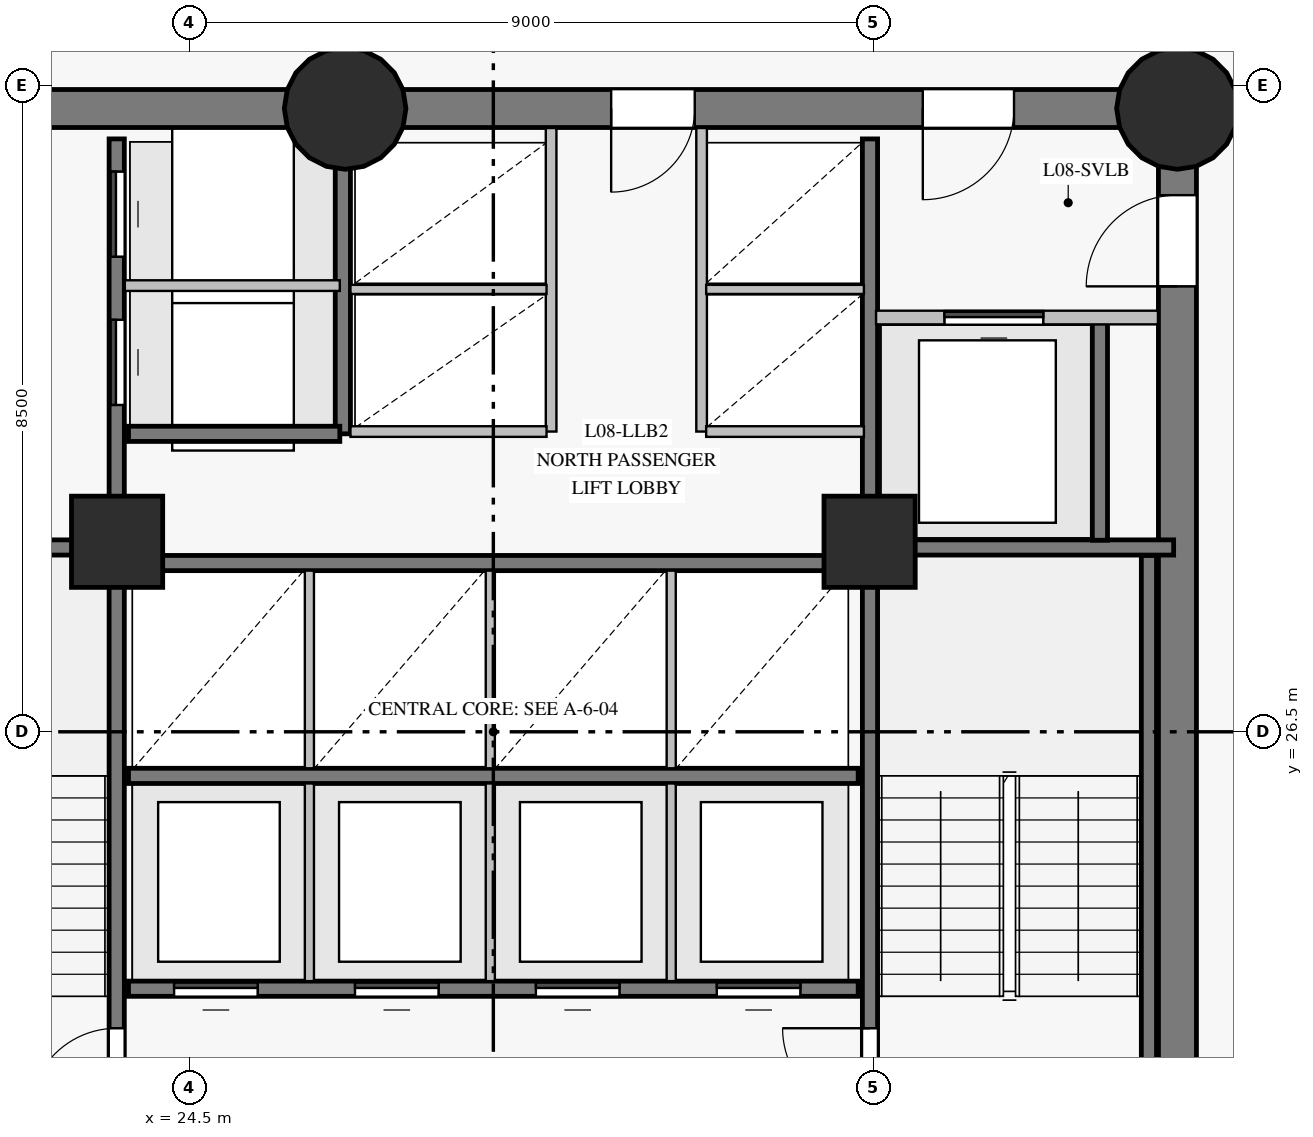
"""IFC4 building model, lengths in metres.
Left out: names, types, materials, properties, quantities, classifications, styles, units other than length and angle.
Written with IfcOpenShell. Run it as: python <this file> out.ifc"""

import sys

from ifc_helpers import new_model, si_unit, direction, frame, frame_2d, origin, origin_with_axes, origin_2d, place, context, subcontext, project, spatial, rectangle, circle, extrude, source, transform, mapped, element, fill, save


model = new_model("IFC4")
c1 = context("Model", 3, precision=1e-05, world=origin(), true_north=direction((0.0, 1.0)))
c2 = subcontext(c1, "Body", "Model", "MODEL_VIEW")
j1 = project(units=[si_unit("LENGTHUNIT", "METRE"), si_unit("PLANEANGLEUNIT", "RADIAN")], contexts=[c1])
p1 = place(None, origin())
s1 = spatial("IfcSite", under=j1, at=p1, CompositionType="ELEMENT")
p2 = place(p1, origin())
s2 = spatial("IfcBuilding", under=s1, at=p2, CompositionType="ELEMENT")
p3 = place(p2, frame((0.0, 0.0, 33.7)))
s3 = spatial("IfcBuildingStorey", under=s2, at=p3, CompositionType="ELEMENT", Elevation=33.7)
p4 = place(p3, frame((37.5, 18.3, 0.0), z_axis=(0.0, 0.0, 1.0), x_axis=(0.0, 1.0, 0.0)))
e1 = element("IfcWall", 1, at=p4, inside=s3, PredefinedType="SHEAR", context=c2, shape_type="SweptSolid", body=[
    extrude(rectangle(XDim=16.4, YDim=0.5, at=frame_2d((8.2, 0.0))), origin(), (0.0, 0.0, 1.0), 3.35),
])
p5 = place(p4, frame((14.06, 0.0, 0.0)))
e2 = element("IfcOpeningElement", 2, at=p5, cuts=e1, PredefinedType="OPENING", context=c2, shape_type="SweptSolid", body=[
    extrude(rectangle(XDim=1.2, YDim=2.15, at=frame_2d((0.6, 1.075))), frame((0.0, 0.26, 0.0), z_axis=(0.0, -1.0, 0.0), x_axis=(1.0, 0.0, 0.0)), (0.0, 0.0, 1.0), 0.52),
])
p6 = place(p3, frame((37.5, 34.7, 0.0), z_axis=(0.0, 0.0, 1.0), x_axis=(-1.0, 0.0, 0.0)))
e3 = element("IfcWall", 3, at=p6, inside=s3, PredefinedType="SHEAR", context=c2, shape_type="SweptSolid", body=[
    extrude(rectangle(XDim=10.95, YDim=0.5, at=frame_2d((5.475, 0.0))), origin(), (0.0, 0.0, 1.0), 3.35),
])
p7 = place(p6, frame((2.15, 0.0, 0.0)))
e4 = element("IfcOpeningElement", 4, at=p7, cuts=e3, PredefinedType="OPENING", context=c2, shape_type="SweptSolid", body=[
    extrude(rectangle(XDim=1.2, YDim=2.15, at=frame_2d((0.6, 1.075))), frame((0.0, 0.26, 0.0), z_axis=(0.0, -1.0, 0.0), x_axis=(1.0, 0.0, 0.0)), (0.0, 0.0, 1.0), 0.52),
])
p8 = place(p6, frame((6.35, 0.0, 0.0)))
e5 = element("IfcOpeningElement", 5, at=p8, cuts=e3, PredefinedType="OPENING", context=c2, shape_type="SweptSolid", body=[
    extrude(rectangle(XDim=1.1, YDim=2.15, at=frame_2d((0.55, 1.075))), frame((0.0, 0.26, 0.0), z_axis=(0.0, -1.0, 0.0), x_axis=(1.0, 0.0, 0.0)), (0.0, 0.0, 1.0), 0.52),
])
p9 = place(p3, frame((26.55, 34.7, 0.0), z_axis=(0.0, 0.0, 1.0), x_axis=(-1.0, 0.0, 0.0)))
e6 = element("IfcWall", 6, at=p9, inside=s3, PredefinedType="SHEAR", context=c2, shape_type="SweptSolid", body=[
    extrude(rectangle(XDim=7.05, YDim=0.5, at=frame_2d((3.525, 0.0))), origin(), (0.0, 0.0, 1.0), 3.35),
])
p10 = place(p9, frame((4.25, 0.0, 0.0)))
e7 = element("IfcOpeningElement", 7, at=p10, cuts=e6, PredefinedType="OPENING", context=c2, shape_type="SweptSolid", body=[
    extrude(rectangle(XDim=1.1, YDim=2.15, at=frame_2d((0.55, 1.075))), frame((0.0, 0.26, 0.0), z_axis=(0.0, -1.0, 0.0), x_axis=(1.0, 0.0, 0.0)), (0.0, 0.0, 1.0), 0.52),
])
m1 = source(origin_with_axes(), c2, "Body", "SweptSolid", [
    extrude(circle(Radius=0.8, at=origin_2d()), origin(), (0.0, 0.0, 1.0), 3.6),
])
for number, where, z_axis, x_axis in (
    (8, (26.55, 34.7, 0.0), (0.0, 0.0, 1.0), (1.0, 0.0, 0.0)),
    (9, (37.5, 34.7, 0.0), (0.0, 0.0, 1.0), (1.0, 0.0, 0.0)),
):
    element("IfcColumn", number, at=place(p3, frame(where, z_axis=z_axis, x_axis=x_axis)), inside=s3, PredefinedType="COLUMN", context=c2, shape_type="MappedRepresentation", body=[
        mapped(m1, transform((0.0, 0.0, 0.0), scale=1.0)),
    ])
m2 = source(origin_with_axes(), c2, "Body", "SweptSolid", [
    extrude(rectangle(XDim=1.2, YDim=1.2, at=origin_2d()), origin(), (0.0, 0.0, 1.0), 3.6),
])
for number, where, z_axis, x_axis in (
    (10, (23.55, 29.0, 0.0), (0.0, 0.0, 1.0), (1.0, 0.0, 0.0)),
    (11, (33.45, 29.0, 0.0), (0.0, 0.0, 1.0), (1.0, 0.0, 0.0)),
):
    element("IfcColumn", number, at=place(p3, frame(where, z_axis=z_axis, x_axis=x_axis)), inside=s3, PredefinedType="COLUMN", context=c2, shape_type="MappedRepresentation", body=[
        mapped(m2, transform((0.0, 0.0, 0.0), scale=1.0)),
    ])
p11 = place(p3, frame((23.545, 18.7, 0.0), z_axis=(0.0, 0.0, 1.0), x_axis=(0.0, 1.0, 0.0)))
e12 = element("IfcWall", 12, at=p11, inside=s3, PredefinedType="SHEAR", context=c2, shape_type="SweptSolid", body=[
    extrude(rectangle(XDim=15.6, YDim=0.2, at=frame_2d((7.8, 0.0))), origin(), (0.0, 0.0, 1.0), 3.35),
])
p12 = place(p11, frame((2.75, 0.0, 0.0)))
e13 = element("IfcOpeningElement", 13, at=p12, cuts=e12, PredefinedType="OPENING", context=c2, shape_type="SweptSolid", body=[
    extrude(rectangle(XDim=1.15, YDim=2.15, at=frame_2d((0.575, 1.075))), frame((0.0, 0.11, 0.0), z_axis=(0.0, -1.0, 0.0), x_axis=(1.0, 0.0, 0.0)), (0.0, 0.0, 1.0), 0.22),
])
p13 = place(p11, frame((0.14, 0.0, 0.0)))
e14 = element("IfcOpeningElement", 14, at=p13, cuts=e12, PredefinedType="OPENING", context=c2, shape_type="SweptSolid", body=[
    extrude(rectangle(XDim=0.88, YDim=2.1, at=frame_2d((0.44, 1.05))), frame((0.0, 0.11, 0.0), z_axis=(0.0, -1.0, 0.0), x_axis=(1.0, 0.0, 0.0)), (0.0, 0.0, 1.0), 0.22),
])
p14 = place(p11, frame((1.36, 0.0, 0.0)))
e15 = element("IfcOpeningElement", 15, at=p14, cuts=e12, PredefinedType="OPENING", context=c2, shape_type="SweptSolid", body=[
    extrude(rectangle(XDim=0.88, YDim=2.1, at=frame_2d((0.44, 1.05))), frame((0.0, 0.11, 0.0), z_axis=(0.0, -1.0, 0.0), x_axis=(1.0, 0.0, 0.0)), (0.0, 0.0, 1.0), 0.22),
])
p15 = place(p11, frame((12.1, 0.0, 0.0)))
e16 = element("IfcOpeningElement", 16, at=p15, cuts=e12, PredefinedType="OPENING", context=c2, shape_type="SweptSolid", body=[
    extrude(rectangle(XDim=1.12, YDim=2.15, at=frame_2d((0.56, 1.075))), frame((0.0, 0.11, 0.0), z_axis=(0.0, -1.0, 0.0), x_axis=(1.0, 0.0, 0.0)), (0.0, 0.0, 1.0), 0.22),
])
p16 = place(p11, frame((14.05, 0.0, 0.0)))
e17 = element("IfcOpeningElement", 17, at=p16, cuts=e12, PredefinedType="OPENING", context=c2, shape_type="SweptSolid", body=[
    extrude(rectangle(XDim=1.12, YDim=2.15, at=frame_2d((0.56, 1.075))), frame((0.0, 0.11, 0.0), z_axis=(0.0, -1.0, 0.0), x_axis=(1.0, 0.0, 0.0)), (0.0, 0.0, 1.0), 0.22),
])
p17 = place(p3, frame((33.455, 18.7, 0.0), z_axis=(0.0, 0.0, 1.0), x_axis=(0.0, 1.0, 0.0)))
e18 = element("IfcWall", 18, at=p17, inside=s3, PredefinedType="SHEAR", context=c2, shape_type="SweptSolid", body=[
    extrude(rectangle(XDim=15.6, YDim=0.2, at=frame_2d((7.8, 0.0))), origin(), (0.0, 0.0, 1.0), 3.35),
])
p18 = place(p17, frame((2.75, 0.0, 0.0)))
e19 = element("IfcOpeningElement", 19, at=p18, cuts=e18, PredefinedType="OPENING", context=c2, shape_type="SweptSolid", body=[
    extrude(rectangle(XDim=1.15, YDim=2.15, at=frame_2d((0.575, 1.075))), frame((0.0, 0.11, 0.0), z_axis=(0.0, -1.0, 0.0), x_axis=(1.0, 0.0, 0.0)), (0.0, 0.0, 1.0), 0.22),
])
p19 = place(p17, frame((0.55, 0.0, 0.0)))
e20 = element("IfcOpeningElement", 20, at=p19, cuts=e18, PredefinedType="OPENING", context=c2, shape_type="SweptSolid", body=[
    extrude(rectangle(XDim=0.94, YDim=2.1, at=frame_2d((0.47, 1.05))), frame((0.0, 0.11, 0.0), z_axis=(0.0, -1.0, 0.0), x_axis=(1.0, 0.0, 0.0)), (0.0, 0.0, 1.0), 0.22),
])
p20 = place(p3, frame((23.7, 23.12, 0.0), z_axis=(0.0, 0.0, 1.0), x_axis=(1.0, 0.0, 0.0)))
e21 = element("IfcWall", 21, at=p20, inside=s3, PredefinedType="SHEAR", context=c2, shape_type="SweptSolid", body=[
    extrude(rectangle(XDim=9.6, YDim=0.2, at=frame_2d((4.8, 0.0))), origin(), (0.0, 0.0, 1.0), 3.35),
])
p21 = place(p20, frame((0.6, 0.0, 0.0)))
e22 = element("IfcOpeningElement", 22, at=p21, cuts=e21, PredefinedType="OPENING", context=c2, shape_type="SweptSolid", body=[
    extrude(rectangle(XDim=1.1, YDim=2.15, at=frame_2d((0.55, 1.075))), frame((0.0, 0.11, 0.0), z_axis=(0.0, -1.0, 0.0), x_axis=(1.0, 0.0, 0.0)), (0.0, 0.0, 1.0), 0.22),
])
p22 = place(p20, frame((2.98, 0.0, 0.0)))
e23 = element("IfcOpeningElement", 23, at=p22, cuts=e21, PredefinedType="OPENING", context=c2, shape_type="SweptSolid", body=[
    extrude(rectangle(XDim=1.1, YDim=2.15, at=frame_2d((0.55, 1.075))), frame((0.0, 0.11, 0.0), z_axis=(0.0, -1.0, 0.0), x_axis=(1.0, 0.0, 0.0)), (0.0, 0.0, 1.0), 0.22),
])
p23 = place(p20, frame((5.36, 0.0, 0.0)))
e24 = element("IfcOpeningElement", 24, at=p23, cuts=e21, PredefinedType="OPENING", context=c2, shape_type="SweptSolid", body=[
    extrude(rectangle(XDim=1.1, YDim=2.15, at=frame_2d((0.55, 1.075))), frame((0.0, 0.11, 0.0), z_axis=(0.0, -1.0, 0.0), x_axis=(1.0, 0.0, 0.0)), (0.0, 0.0, 1.0), 0.22),
])
p24 = place(p20, frame((7.74, 0.0, 0.0)))
e25 = element("IfcOpeningElement", 25, at=p24, cuts=e21, PredefinedType="OPENING", context=c2, shape_type="SweptSolid", body=[
    extrude(rectangle(XDim=1.1, YDim=2.15, at=frame_2d((0.55, 1.075))), frame((0.0, 0.11, 0.0), z_axis=(0.0, -1.0, 0.0), x_axis=(1.0, 0.0, 0.0)), (0.0, 0.0, 1.0), 0.22),
])
for number, where, z_axis, x_axis in (
    (26, (23.7, 25.92, 0.0), (0.0, 0.0, 1.0), (1.0, 0.0, 0.0)),
    (27, (23.7, 28.72, 0.0), (0.0, 0.0, 1.0), (1.0, 0.0, 0.0)),
):
    element("IfcWall", number, at=place(p3, frame(where, z_axis=z_axis, x_axis=x_axis)), inside=s3, PredefinedType="SHEAR", context=c2, shape_type="SweptSolid", body=[
        extrude(rectangle(XDim=9.6, YDim=0.2, at=frame_2d((4.8, 0.0))), origin(), (0.0, 0.0, 1.0), 3.35),
    ])
p25 = place(p3, frame((37.125, 21.32, 0.0), z_axis=(0.0, 0.0, 1.0), x_axis=(0.0, 1.0, 0.0)))
e28 = element("IfcWall", 28, at=p25, inside=s3, PredefinedType="SHEAR", context=c2, shape_type="SweptSolid", body=[
    extrude(rectangle(XDim=7.5, YDim=0.2, at=frame_2d((3.75, 0.0))), origin(), (0.0, 0.0, 1.0), 3.35),
])
for number, where, z_axis, x_axis in (
    (29, (33.455, 28.925, 0.0), (0.0, 0.0, 1.0), (1.0, 0.0, 0.0)),
    (30, (19.55, 28.925, 0.0), (0.0, 0.0, 1.0), (1.0, 0.0, 0.0)),
):
    element("IfcWall", number, at=place(p3, frame(where, z_axis=z_axis, x_axis=x_axis)), inside=s3, PredefinedType="SHEAR", context=c2, shape_type="SweptSolid", body=[
        extrude(rectangle(XDim=3.995, YDim=0.2, at=frame_2d((1.998, 0.0))), origin(), (0.0, 0.0, 1.0), 3.35),
    ])
p26 = place(p3, frame((26.52, 30.42, 0.0), z_axis=(0.0, 0.0, 1.0), x_axis=(0.0, 1.0, 0.0)))
e31 = element("IfcWall", 31, at=p26, inside=s3, PredefinedType="SHEAR", context=c2, shape_type="SweptSolid", body=[
    extrude(rectangle(XDim=3.86, YDim=0.2, at=frame_2d((1.93, 0.0))), origin(), (0.0, 0.0, 1.0), 3.35),
])
p27 = place(p3, frame((36.48, 29.02, 0.0), z_axis=(0.0, 0.0, 1.0), x_axis=(0.0, 1.0, 0.0)))
e32 = element("IfcWall", 32, at=p27, inside=s3, PredefinedType="SHEAR", context=c2, shape_type="SweptSolid", body=[
    extrude(rectangle(XDim=2.86, YDim=0.2, at=frame_2d((1.43, 0.0))), origin(), (0.0, 0.0, 1.0), 3.35),
])
p28 = place(p3, frame((23.7, 30.42, 0.0), z_axis=(0.0, 0.0, 1.0), x_axis=(1.0, 0.0, 0.0)))
e33 = element("IfcWall", 33, at=p28, inside=s3, PredefinedType="SHEAR", context=c2, shape_type="SweptSolid", body=[
    extrude(rectangle(XDim=2.78, YDim=0.2, at=frame_2d((1.39, 0.0))), origin(), (0.0, 0.0, 1.0), 3.35),
])
for number, where, z_axis, x_axis in (
    (34, (29.26, 30.45, 0.0), (0.0, 0.0, 1.0), (0.0, 1.0, 0.0)),
    (35, (31.24, 30.45, 0.0), (0.0, 0.0, 1.0), (0.0, 1.0, 0.0)),
):
    element("IfcWall", number, at=place(p3, frame(where, z_axis=z_axis, x_axis=x_axis)), inside=s3, PredefinedType="PARTITIONING", context=c2, shape_type="SweptSolid", body=[
        extrude(rectangle(XDim=3.993, YDim=0.14, at=frame_2d((1.997, 0.0))), origin(), (0.0, 0.0, 1.0), 3.35),
    ])
p29 = place(p3, frame((33.535, 31.95, 0.0), z_axis=(0.0, 0.0, 1.0), x_axis=(1.0, 0.0, 0.0)))
e36 = element("IfcWall", 36, at=p29, inside=s3, PredefinedType="PARTITIONING", context=c2, shape_type="SweptSolid", body=[
    extrude(rectangle(XDim=3.709, YDim=0.18, at=frame_2d((1.854, 0.0))), origin(), (0.0, 0.0, 1.0), 3.35),
])
p30 = place(p29, frame((0.9, 0.0, 0.0)))
e37 = element("IfcOpeningElement", 37, at=p30, cuts=e36, PredefinedType="OPENING", context=c2, shape_type="SweptSolid", body=[
    extrude(rectangle(XDim=1.3, YDim=2.2, at=frame_2d((0.65, 1.1))), frame((0.0, 0.1, 0.0), z_axis=(0.0, -1.0, 0.0), x_axis=(1.0, 0.0, 0.0)), (0.0, 0.0, 1.0), 0.2),
])
p31 = place(p3, frame((23.652, 32.37, 0.0), z_axis=(0.0, 0.0, 1.0), x_axis=(1.0, 0.0, 0.0)))
e38 = element("IfcWall", 38, at=p31, inside=s3, PredefinedType="PARTITIONING", context=c2, shape_type="SweptSolid", body=[
    extrude(rectangle(XDim=2.828, YDim=0.14, at=frame_2d((1.414, 0.0))), origin(), (0.0, 0.0, 1.0), 3.35),
])
for number, where, z_axis, x_axis in (
    (39, (26.08, 23.22, 0.0), (0.0, 0.0, 1.0), (0.0, 1.0, 0.0)),
    (40, (28.46, 23.22, 0.0), (0.0, 0.0, 1.0), (0.0, 1.0, 0.0)),
    (41, (30.84, 23.22, 0.0), (0.0, 0.0, 1.0), (0.0, 1.0, 0.0)),
    (42, (26.08, 26.02, 0.0), (0.0, 0.0, 1.0), (0.0, 1.0, 0.0)),
    (43, (28.46, 26.02, 0.0), (0.0, 0.0, 1.0), (0.0, 1.0, 0.0)),
    (44, (30.84, 26.02, 0.0), (0.0, 0.0, 1.0), (0.0, 1.0, 0.0)),
):
    element("IfcWall", number, at=place(p3, frame(where, z_axis=z_axis, x_axis=x_axis)), inside=s3, PredefinedType="PARTITIONING", context=c2, shape_type="SweptSolid", body=[
        extrude(rectangle(XDim=2.6, YDim=0.12, at=frame_2d((1.3, 0.0))), origin(), (0.0, 0.0, 1.0), 3.35),
    ])
p32 = place(p3, frame((26.62, 30.45, 0.0), z_axis=(0.0, 0.0, 1.0), x_axis=(1.0, 0.0, 0.0)))
e45 = element("IfcWall", 45, at=p32, inside=s3, PredefinedType="PARTITIONING", context=c2, shape_type="SweptSolid", body=[
    extrude(rectangle(XDim=2.58, YDim=0.14, at=frame_2d((1.29, 0.0))), origin(), (0.0, 0.0, 1.0), 3.35),
])
p33 = place(p3, frame((26.62, 32.32, 0.0), z_axis=(0.0, 0.0, 1.0), x_axis=(1.0, 0.0, 0.0)))
e46 = element("IfcWall", 46, at=p33, inside=s3, PredefinedType="PARTITIONING", context=c2, shape_type="SweptSolid", body=[
    extrude(rectangle(XDim=2.58, YDim=0.12, at=frame_2d((1.29, 0.0))), origin(), (0.0, 0.0, 1.0), 3.35),
])
p34 = place(p3, frame((31.3, 30.45, 0.0), z_axis=(0.0, 0.0, 1.0), x_axis=(1.0, 0.0, 0.0)))
e47 = element("IfcWall", 47, at=p34, inside=s3, PredefinedType="PARTITIONING", context=c2, shape_type="SweptSolid", body=[
    extrude(rectangle(XDim=2.075, YDim=0.14, at=frame_2d((1.038, 0.0))), origin(), (0.0, 0.0, 1.0), 3.35),
])
p35 = place(p3, frame((31.3, 32.32, 0.0), z_axis=(0.0, 0.0, 1.0), x_axis=(1.0, 0.0, 0.0)))
e48 = element("IfcWall", 48, at=p35, inside=s3, PredefinedType="PARTITIONING", context=c2, shape_type="SweptSolid", body=[
    extrude(rectangle(XDim=2.075, YDim=0.12, at=frame_2d((1.038, 0.0))), origin(), (0.0, 0.0, 1.0), 3.35),
])
m3 = source(origin_with_axes(), c2, "Body", "SweptSolid", [
    extrude(rectangle(XDim=1.15, YDim=2.15, at=frame_2d((0.575, 1.075))), frame((0.0, 0.025, 0.0), z_axis=(0.0, -1.0, 0.0), x_axis=(1.0, 0.0, 0.0)), (0.0, 0.0, 1.0), 0.05),
])
p36 = place(p12, origin())
e49 = element("IfcDoor", 49, at=p36, inside=s3, OperationType="SINGLE_SWING_LEFT", PredefinedType="DOOR", context=c2, shape_type="MappedRepresentation", body=[
    mapped(m3, transform((0.0, 0.0, 0.0), scale=1.0)),
])
fill(e13, e49)
p37 = place(p18, origin())
e50 = element("IfcDoor", 50, at=p37, inside=s3, OperationType="SINGLE_SWING_RIGHT", PredefinedType="DOOR", context=c2, shape_type="MappedRepresentation", body=[
    mapped(m3, transform((0.0, 0.0, 0.0), scale=1.0)),
])
fill(e19, e50)
m4 = source(origin_with_axes(), c2, "Body", "SweptSolid", [
    extrude(rectangle(XDim=1.2, YDim=2.15, at=frame_2d((0.6, 1.075))), frame((0.0, 0.025, 0.0), z_axis=(0.0, -1.0, 0.0), x_axis=(1.0, 0.0, 0.0)), (0.0, 0.0, 1.0), 0.05),
])
p38 = place(p5, origin())
e51 = element("IfcDoor", 51, at=p38, inside=s3, OperationType="SINGLE_SWING_LEFT", PredefinedType="DOOR", context=c2, shape_type="MappedRepresentation", body=[
    mapped(m4, transform((0.0, 0.0, 0.0), scale=1.0)),
])
fill(e2, e51)
p39 = place(p7, origin())
e52 = element("IfcDoor", 52, at=p39, inside=s3, OperationType="SINGLE_SWING_RIGHT", PredefinedType="DOOR", context=c2, shape_type="MappedRepresentation", body=[
    mapped(m4, transform((0.0, 0.0, 0.0), scale=1.0)),
])
fill(e4, e52)
m5 = source(origin_with_axes(), c2, "Body", "SweptSolid", [
    extrude(rectangle(XDim=1.3, YDim=2.2, at=frame_2d((0.65, 1.1))), frame((0.0, 0.025, 0.0), z_axis=(0.0, -1.0, 0.0), x_axis=(1.0, 0.0, 0.0)), (0.0, 0.0, 1.0), 0.05),
])
p40 = place(p30, origin())
e53 = element("IfcDoor", 53, at=p40, inside=s3, OperationType="SLIDING_TO_LEFT", PredefinedType="DOOR", context=c2, shape_type="MappedRepresentation", body=[
    mapped(m5, transform((0.0, 0.0, 0.0), scale=1.0)),
])
fill(e37, e53)
m6 = source(origin_with_axes(), c2, "Body", "SweptSolid", [
    extrude(rectangle(XDim=1.1, YDim=2.15, at=frame_2d((0.55, 1.075))), frame((0.0, 0.025, 0.0), z_axis=(0.0, -1.0, 0.0), x_axis=(1.0, 0.0, 0.0)), (0.0, 0.0, 1.0), 0.05),
])
p41 = place(p21, origin())
e54 = element("IfcDoor", 54, at=p41, inside=s3, OperationType="SLIDING_TO_LEFT", PredefinedType="DOOR", context=c2, shape_type="MappedRepresentation", body=[
    mapped(m6, transform((0.0, 0.0, 0.0), scale=1.0)),
])
fill(e22, e54)
p42 = place(p22, origin())
e55 = element("IfcDoor", 55, at=p42, inside=s3, OperationType="SLIDING_TO_RIGHT", PredefinedType="DOOR", context=c2, shape_type="MappedRepresentation", body=[
    mapped(m6, transform((0.0, 0.0, 0.0), scale=1.0)),
])
fill(e23, e55)
p43 = place(p23, origin())
e56 = element("IfcDoor", 56, at=p43, inside=s3, OperationType="SLIDING_TO_LEFT", PredefinedType="DOOR", context=c2, shape_type="MappedRepresentation", body=[
    mapped(m6, transform((0.0, 0.0, 0.0), scale=1.0)),
])
fill(e24, e56)
p44 = place(p24, origin())
e57 = element("IfcDoor", 57, at=p44, inside=s3, OperationType="SLIDING_TO_RIGHT", PredefinedType="DOOR", context=c2, shape_type="MappedRepresentation", body=[
    mapped(m6, transform((0.0, 0.0, 0.0), scale=1.0)),
])
fill(e25, e57)
p45 = place(p8, origin())
e58 = element("IfcDoor", 58, at=p45, inside=s3, OperationType="SINGLE_SWING_RIGHT", PredefinedType="DOOR", context=c2, shape_type="MappedRepresentation", body=[
    mapped(m6, transform((0.0, 0.0, 0.0), scale=1.0)),
])
fill(e5, e58)
m7 = source(origin_with_axes(), c2, "Body", "SweptSolid", [
    extrude(rectangle(XDim=1.12, YDim=2.15, at=frame_2d((0.56, 1.075))), frame((0.0, 0.025, 0.0), z_axis=(0.0, -1.0, 0.0), x_axis=(1.0, 0.0, 0.0)), (0.0, 0.0, 1.0), 0.05),
])
p46 = place(p15, origin())
e59 = element("IfcDoor", 59, at=p46, inside=s3, OperationType="SLIDING_TO_LEFT", PredefinedType="DOOR", context=c2, shape_type="MappedRepresentation", body=[
    mapped(m7, transform((0.0, 0.0, 0.0), scale=1.0)),
])
fill(e16, e59)
p47 = place(p16, origin())
e60 = element("IfcDoor", 60, at=p47, inside=s3, OperationType="SLIDING_TO_RIGHT", PredefinedType="DOOR", context=c2, shape_type="MappedRepresentation", body=[
    mapped(m7, transform((0.0, 0.0, 0.0), scale=1.0)),
])
fill(e17, e60)
save(model, sys.argv[1])
